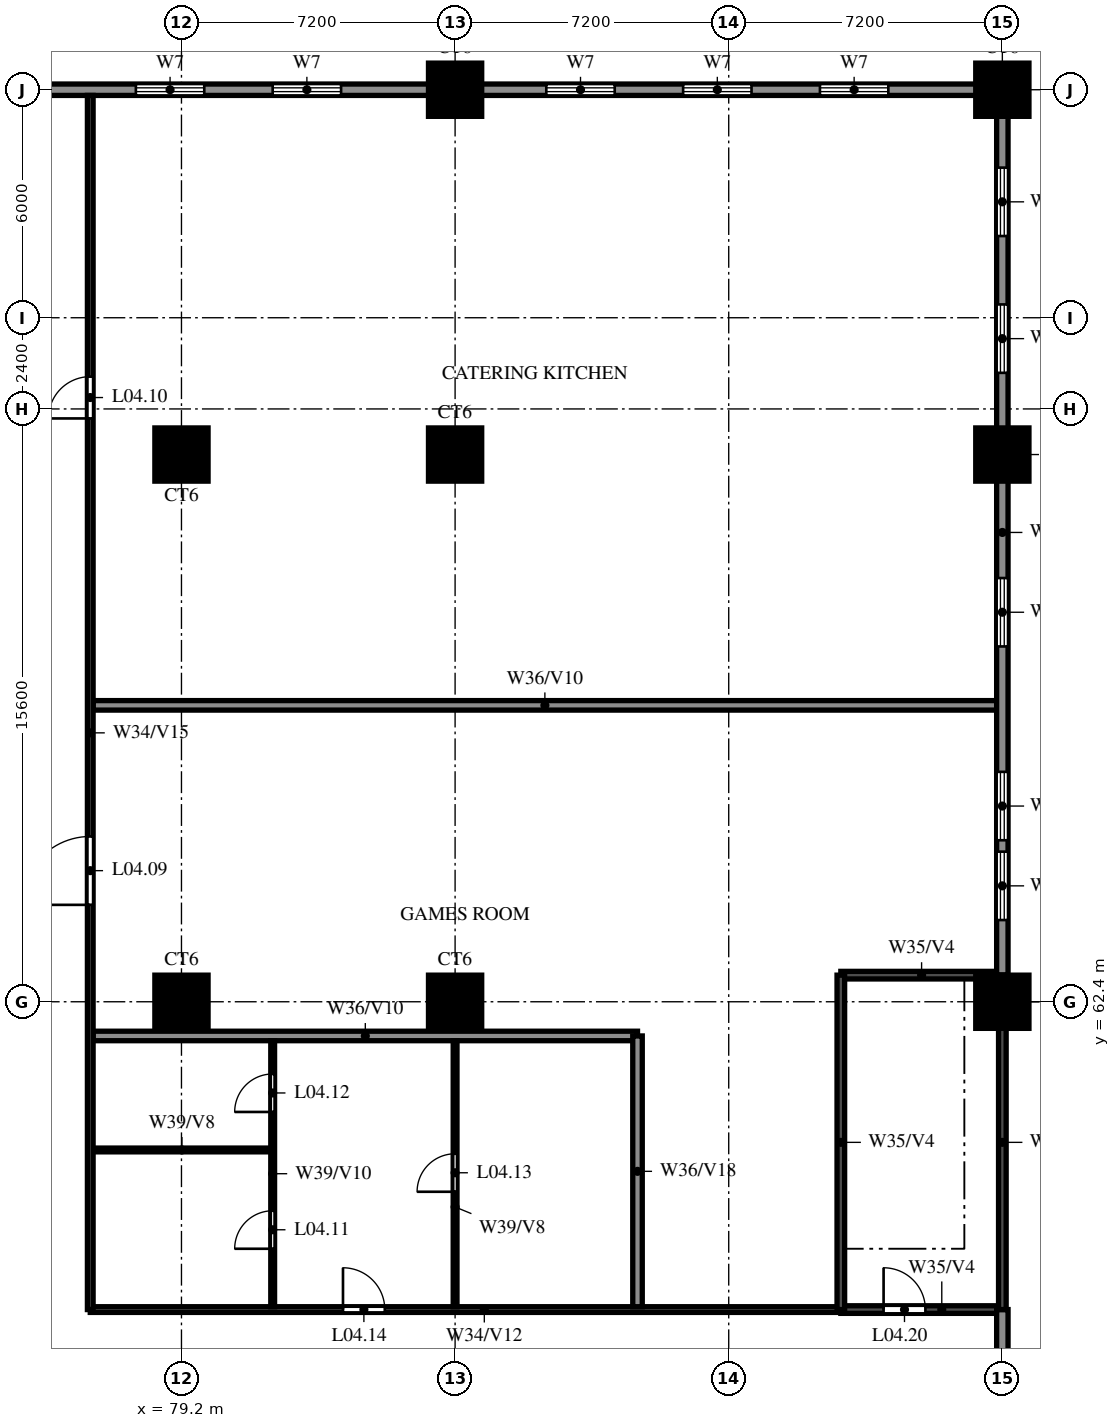
"""IFC4 building model, lengths in metres.
Left out: names, types, materials, properties, quantities, classifications, styles, units other than length and angle.
Written with IfcOpenShell. Run it as: python <this file> out.ifc"""

import sys

from ifc_helpers import new_model, si_unit, direction, frame, frame_2d, origin, origin_2d, place, context, subcontext, project, spatial, rectangle, circle, extrude, source, transform, mapped, element, fill, save


model = new_model("IFC4")
c1 = context("Model", 3, precision=1e-05, world=origin(), true_north=direction((0.0, 1.0)))
c2 = subcontext(c1, "Body", "Model", "MODEL_VIEW")
j1 = project(units=[si_unit("LENGTHUNIT", "METRE"), si_unit("PLANEANGLEUNIT", "RADIAN")], contexts=[c1])
p1 = place(None, origin())
s1 = spatial("IfcSite", under=j1, at=p1, CompositionType="ELEMENT")
p2 = place(p1, origin())
s2 = spatial("IfcBuilding", under=s1, at=p2, CompositionType="ELEMENT")
p3 = place(p2, frame((0.0, 0.0, 21.6)))
s3 = spatial("IfcBuildingStorey", under=s2, at=p3, CompositionType="ELEMENT", Elevation=21.6)
m1 = source(origin(), c2, "Body", "SweptSolid", [
    extrude(circle(Radius=0.7, at=origin_2d()), origin(), (0.0, 0.0, 1.0), 4.95),
])
for number, where, z_axis, x_axis in (
    (1, (79.2, 62.4, 0.0), (0.0, 0.0, 1.0), (1.0, 0.0, 0.0)),
    (2, (86.4, 62.4, 0.0), (0.0, 0.0, 1.0), (1.0, 0.0, 0.0)),
    (3, (100.8, 62.4, 0.0), (0.0, 0.0, 1.0), (1.0, 0.0, 0.0)),
    (4, (79.2, 76.8, 0.0), (0.0, 0.0, 1.0), (1.0, 0.0, 0.0)),
    (5, (86.4, 76.8, 0.0), (0.0, 0.0, 1.0), (1.0, 0.0, 0.0)),
    (6, (100.8, 76.8, 0.0), (0.0, 0.0, 1.0), (1.0, 0.0, 0.0)),
    (7, (86.4, 86.4, 0.0), (0.0, 0.0, 1.0), (1.0, 0.0, 0.0)),
    (8, (100.8, 86.4, 0.0), (0.0, 0.0, 1.0), (1.0, 0.0, 0.0)),
):
    element("IfcColumn", number, at=place(p3, frame(where, z_axis=z_axis, x_axis=x_axis)), inside=s3, PredefinedType="COLUMN", context=c2, shape_type="MappedRepresentation", body=[
        mapped(m1, transform((0.0, 0.0, 0.0))),
    ])
p4 = place(p3, frame((76.8, 54.3, 0.0), z_axis=(0.0, 0.0, 1.0), x_axis=(1.0, 0.0, 0.0)))
e9 = element("IfcWall", 9, at=p4, inside=s3, PredefinedType="PARTITIONING", context=c2, shape_type="SweptSolid", body=[
    extrude(rectangle(XDim=19.75, YDim=0.15, at=frame_2d((9.875, 0.0))), origin(), (0.0, 0.0, 1.0), 3.45),
])
p5 = place(p4, frame((6.65, 0.0, 0.0)))
e10 = element("IfcOpeningElement", 10, at=p5, cuts=e9, PredefinedType="OPENING", context=c2, shape_type="SweptSolid", body=[
    extrude(rectangle(XDim=1.1, YDim=2.1, at=frame_2d((0.55, 1.05))), frame((0.0, 0.085, 0.0), z_axis=(0.0, -1.0, 0.0), x_axis=(1.0, 0.0, 0.0)), (0.0, 0.0, 1.0), 0.17),
])
p6 = place(p3, frame((96.55, 54.3, 0.0), z_axis=(0.0, 0.0, 1.0), x_axis=(1.0, 0.0, 0.0)))
e11 = element("IfcWall", 11, at=p6, inside=s3, PredefinedType="SOLIDWALL", context=c2, shape_type="SweptSolid", body=[
    extrude(rectangle(XDim=4.25, YDim=0.2, at=frame_2d((2.125, 0.0))), origin(), (0.0, 0.0, 1.0), 4.95),
])
p7 = place(p6, frame((1.125, 0.0, 0.0)))
e12 = element("IfcOpeningElement", 12, at=p7, cuts=e11, PredefinedType="OPENING", context=c2, shape_type="SweptSolid", body=[
    extrude(rectangle(XDim=1.1, YDim=2.1, at=frame_2d((0.55, 1.05))), frame((0.0, 0.11, 0.0), z_axis=(0.0, -1.0, 0.0), x_axis=(1.0, 0.0, 0.0)), (0.0, 0.0, 1.0), 0.22),
])
p8 = place(p3, frame((76.875, 58.5, 0.0), z_axis=(0.0, 0.0, 1.0), x_axis=(1.0, 0.0, 0.0)))
e13 = element("IfcWall", 13, at=p8, inside=s3, PredefinedType="PARTITIONING", context=c2, shape_type="SweptSolid", body=[
    extrude(rectangle(XDim=4.675, YDim=0.1, at=frame_2d((2.337, 0.0))), origin(), (0.0, 0.0, 1.0), 3.45),
])
p9 = place(p3, frame((76.875, 61.5, 0.0), z_axis=(0.0, 0.0, 1.0), x_axis=(1.0, 0.0, 0.0)))
e14 = element("IfcWall", 14, at=p9, inside=s3, PredefinedType="SOLIDWALL", context=c2, shape_type="SweptSolid", body=[
    extrude(rectangle(XDim=14.325, YDim=0.25, at=frame_2d((7.163, 0.0))), origin(), (0.0, 0.0, 1.0), 3.45),
])
p10 = place(p3, frame((96.55, 63.1, 0.0), z_axis=(0.0, 0.0, 1.0), x_axis=(1.0, 0.0, 0.0)))
e15 = element("IfcWall", 15, at=p10, inside=s3, PredefinedType="SOLIDWALL", context=c2, shape_type="SweptSolid", body=[
    extrude(rectangle(XDim=4.25, YDim=0.2, at=frame_2d((2.125, 0.0))), origin(), (0.0, 0.0, 1.0), 4.95),
])
p11 = place(p3, frame((76.875, 70.2, 0.0), z_axis=(0.0, 0.0, 1.0), x_axis=(1.0, 0.0, 0.0)))
e16 = element("IfcWall", 16, at=p11, inside=s3, PredefinedType="SOLIDWALL", context=c2, shape_type="SweptSolid", body=[
    extrude(rectangle(XDim=23.775, YDim=0.25, at=frame_2d((11.887, 0.0))), origin(), (0.0, 0.0, 1.0), 3.45),
])
p12 = place(p3, frame((0.0, 86.4, 0.0), z_axis=(0.0, 0.0, 1.0), x_axis=(1.0, 0.0, 0.0)))
e17 = element("IfcWall", 17, at=p12, inside=s3, PredefinedType="SOLIDWALL", context=c2, shape_type="SweptSolid", body=[
    extrude(rectangle(XDim=100.8, YDim=0.3, at=frame_2d((50.4, 0.0))), origin(), (0.0, 0.0, 1.0), 4.95),
])
p13 = place(p12, frame((2.4, 0.0, 0.6)))
e18 = element("IfcOpeningElement", 18, at=p13, cuts=e17, PredefinedType="OPENING", context=c2, shape_type="SweptSolid", body=[
    extrude(rectangle(XDim=1.8, YDim=2.4, at=frame_2d((0.9, 1.2))), frame((0.0, 0.16, 0.0), z_axis=(0.0, -1.0, 0.0), x_axis=(1.0, 0.0, 0.0)), (0.0, 0.0, 1.0), 0.32),
])
p14 = place(p12, frame((6.0, 0.0, 0.6)))
e19 = element("IfcOpeningElement", 19, at=p14, cuts=e17, PredefinedType="OPENING", context=c2, shape_type="SweptSolid", body=[
    extrude(rectangle(XDim=1.8, YDim=2.4, at=frame_2d((0.9, 1.2))), frame((0.0, 0.16, 0.0), z_axis=(0.0, -1.0, 0.0), x_axis=(1.0, 0.0, 0.0)), (0.0, 0.0, 1.0), 0.32),
])
p15 = place(p12, frame((9.6, 0.0, 0.6)))
e20 = element("IfcOpeningElement", 20, at=p15, cuts=e17, PredefinedType="OPENING", context=c2, shape_type="SweptSolid", body=[
    extrude(rectangle(XDim=1.8, YDim=2.4, at=frame_2d((0.9, 1.2))), frame((0.0, 0.16, 0.0), z_axis=(0.0, -1.0, 0.0), x_axis=(1.0, 0.0, 0.0)), (0.0, 0.0, 1.0), 0.32),
])
p16 = place(p12, frame((16.8, 0.0, 0.6)))
e21 = element("IfcOpeningElement", 21, at=p16, cuts=e17, PredefinedType="OPENING", context=c2, shape_type="SweptSolid", body=[
    extrude(rectangle(XDim=1.8, YDim=2.4, at=frame_2d((0.9, 1.2))), frame((0.0, 0.16, 0.0), z_axis=(0.0, -1.0, 0.0), x_axis=(1.0, 0.0, 0.0)), (0.0, 0.0, 1.0), 0.32),
])
p17 = place(p12, frame((20.4, 0.0, 0.6)))
e22 = element("IfcOpeningElement", 22, at=p17, cuts=e17, PredefinedType="OPENING", context=c2, shape_type="SweptSolid", body=[
    extrude(rectangle(XDim=1.8, YDim=2.4, at=frame_2d((0.9, 1.2))), frame((0.0, 0.16, 0.0), z_axis=(0.0, -1.0, 0.0), x_axis=(1.0, 0.0, 0.0)), (0.0, 0.0, 1.0), 0.32),
])
p18 = place(p12, frame((78.0, 0.0, 0.6)))
e23 = element("IfcOpeningElement", 23, at=p18, cuts=e17, PredefinedType="OPENING", context=c2, shape_type="SweptSolid", body=[
    extrude(rectangle(XDim=1.8, YDim=2.4, at=frame_2d((0.9, 1.2))), frame((0.0, 0.16, 0.0), z_axis=(0.0, -1.0, 0.0), x_axis=(1.0, 0.0, 0.0)), (0.0, 0.0, 1.0), 0.32),
])
p19 = place(p12, frame((81.6, 0.0, 0.6)))
e24 = element("IfcOpeningElement", 24, at=p19, cuts=e17, PredefinedType="OPENING", context=c2, shape_type="SweptSolid", body=[
    extrude(rectangle(XDim=1.8, YDim=2.4, at=frame_2d((0.9, 1.2))), frame((0.0, 0.16, 0.0), z_axis=(0.0, -1.0, 0.0), x_axis=(1.0, 0.0, 0.0)), (0.0, 0.0, 1.0), 0.32),
])
p20 = place(p12, frame((88.8, 0.0, 0.6)))
e25 = element("IfcOpeningElement", 25, at=p20, cuts=e17, PredefinedType="OPENING", context=c2, shape_type="SweptSolid", body=[
    extrude(rectangle(XDim=1.8, YDim=2.4, at=frame_2d((0.9, 1.2))), frame((0.0, 0.16, 0.0), z_axis=(0.0, -1.0, 0.0), x_axis=(1.0, 0.0, 0.0)), (0.0, 0.0, 1.0), 0.32),
])
p21 = place(p12, frame((92.4, 0.0, 0.6)))
e26 = element("IfcOpeningElement", 26, at=p21, cuts=e17, PredefinedType="OPENING", context=c2, shape_type="SweptSolid", body=[
    extrude(rectangle(XDim=1.8, YDim=2.4, at=frame_2d((0.9, 1.2))), frame((0.0, 0.16, 0.0), z_axis=(0.0, -1.0, 0.0), x_axis=(1.0, 0.0, 0.0)), (0.0, 0.0, 1.0), 0.32),
])
p22 = place(p12, frame((96.0, 0.0, 0.6)))
e27 = element("IfcOpeningElement", 27, at=p22, cuts=e17, PredefinedType="OPENING", context=c2, shape_type="SweptSolid", body=[
    extrude(rectangle(XDim=1.8, YDim=2.4, at=frame_2d((0.9, 1.2))), frame((0.0, 0.16, 0.0), z_axis=(0.0, -1.0, 0.0), x_axis=(1.0, 0.0, 0.0)), (0.0, 0.0, 1.0), 0.32),
])
p23 = place(p3, frame((76.8, 54.3, 0.0), z_axis=(0.0, 0.0, 1.0), x_axis=(0.0, 1.0, 0.0)))
e28 = element("IfcWall", 28, at=p23, inside=s3, PredefinedType="PARTITIONING", context=c2, shape_type="SweptSolid", body=[
    extrude(rectangle(XDim=31.95, YDim=0.15, at=frame_2d((15.975, 0.0))), origin(), (0.0, 0.0, 1.0), 3.75),
])
p24 = place(p23, frame((10.65, 0.0, 0.0)))
e29 = element("IfcOpeningElement", 29, at=p24, cuts=e28, PredefinedType="OPENING", context=c2, shape_type="SweptSolid", body=[
    extrude(rectangle(XDim=1.8, YDim=2.1, at=frame_2d((0.9, 1.05))), frame((0.0, 0.085, 0.0), z_axis=(0.0, -1.0, 0.0), x_axis=(1.0, 0.0, 0.0)), (0.0, 0.0, 1.0), 0.17),
])
p25 = place(p23, frame((23.45, 0.0, 0.0)))
e30 = element("IfcOpeningElement", 30, at=p25, cuts=e28, PredefinedType="OPENING", context=c2, shape_type="SweptSolid", body=[
    extrude(rectangle(XDim=1.1, YDim=2.1, at=frame_2d((0.55, 1.05))), frame((0.0, 0.085, 0.0), z_axis=(0.0, -1.0, 0.0), x_axis=(1.0, 0.0, 0.0)), (0.0, 0.0, 1.0), 0.17),
])
p26 = place(p3, frame((81.6, 54.375, 0.0), z_axis=(0.0, 0.0, 1.0), x_axis=(0.0, 1.0, 0.0)))
e31 = element("IfcWall", 31, at=p26, inside=s3, PredefinedType="PARTITIONING", context=c2, shape_type="SweptSolid", body=[
    extrude(rectangle(XDim=7.0, YDim=0.1, at=frame_2d((3.5, 0.0))), origin(), (0.0, 0.0, 1.0), 4.95),
])
p27 = place(p26, frame((1.525, 0.0, 0.0)))
e32 = element("IfcOpeningElement", 32, at=p27, cuts=e31, PredefinedType="OPENING", context=c2, shape_type="SweptSolid", body=[
    extrude(rectangle(XDim=1.0, YDim=2.1, at=frame_2d((0.5, 1.05))), frame((0.0, 0.06, 0.0), z_axis=(0.0, -1.0, 0.0), x_axis=(1.0, 0.0, 0.0)), (0.0, 0.0, 1.0), 0.12),
])
p28 = place(p26, frame((5.125, 0.0, 0.0)))
e33 = element("IfcOpeningElement", 33, at=p28, cuts=e31, PredefinedType="OPENING", context=c2, shape_type="SweptSolid", body=[
    extrude(rectangle(XDim=1.0, YDim=2.1, at=frame_2d((0.5, 1.05))), frame((0.0, 0.06, 0.0), z_axis=(0.0, -1.0, 0.0), x_axis=(1.0, 0.0, 0.0)), (0.0, 0.0, 1.0), 0.12),
])
p29 = place(p3, frame((86.4, 54.375, 0.0), z_axis=(0.0, 0.0, 1.0), x_axis=(0.0, 1.0, 0.0)))
e34 = element("IfcWall", 34, at=p29, inside=s3, PredefinedType="PARTITIONING", context=c2, shape_type="SweptSolid", body=[
    extrude(rectangle(XDim=7.0, YDim=0.1, at=frame_2d((3.5, 0.0))), origin(), (0.0, 0.0, 1.0), 3.45),
])
p30 = place(p29, frame((3.025, 0.0, 0.0)))
e35 = element("IfcOpeningElement", 35, at=p30, cuts=e34, PredefinedType="OPENING", context=c2, shape_type="SweptSolid", body=[
    extrude(rectangle(XDim=1.0, YDim=2.1, at=frame_2d((0.5, 1.05))), frame((0.0, 0.06, 0.0), z_axis=(0.0, -1.0, 0.0), x_axis=(1.0, 0.0, 0.0)), (0.0, 0.0, 1.0), 0.12),
])
p31 = place(p3, frame((91.2, 54.375, 0.0), z_axis=(0.0, 0.0, 1.0), x_axis=(0.0, 1.0, 0.0)))
e36 = element("IfcWall", 36, at=p31, inside=s3, PredefinedType="SOLIDWALL", context=c2, shape_type="SweptSolid", body=[
    extrude(rectangle(XDim=7.125, YDim=0.25, at=frame_2d((3.562, 0.0))), origin(), (0.0, 0.0, 1.0), 4.95),
])
p32 = place(p3, frame((96.55, 54.3, 0.0), z_axis=(0.0, 0.0, 1.0), x_axis=(0.0, 1.0, 0.0)))
e37 = element("IfcWall", 37, at=p32, inside=s3, PredefinedType="SOLIDWALL", context=c2, shape_type="SweptSolid", body=[
    extrude(rectangle(XDim=8.8, YDim=0.2, at=frame_2d((4.4, 0.0))), origin(), (0.0, 0.0, 1.0), 4.95),
])
p33 = place(p3, frame((100.8, 51.1, 0.0), z_axis=(0.0, 0.0, 1.0), x_axis=(0.0, 1.0, 0.0)))
e38 = element("IfcWall", 38, at=p33, inside=s3, PredefinedType="SOLIDWALL", context=c2, shape_type="SweptSolid", body=[
    extrude(rectangle(XDim=3.2, YDim=0.3, at=frame_2d((1.6, 0.0))), origin(), (0.0, 0.0, 1.0), 4.95),
])
p34 = place(p3, frame((100.8, 63.1, 0.0), z_axis=(0.0, 0.0, 1.0), x_axis=(0.0, 1.0, 0.0)))
e39 = element("IfcWall", 39, at=p34, inside=s3, PredefinedType="SOLIDWALL", context=c2, shape_type="SweptSolid", body=[
    extrude(rectangle(XDim=23.3, YDim=0.3, at=frame_2d((11.65, 0.0))), origin(), (0.0, 0.0, 1.0), 4.95),
])
p35 = place(p34, frame((1.45, 0.0, 0.6)))
e40 = element("IfcOpeningElement", 40, at=p35, cuts=e39, PredefinedType="OPENING", context=c2, shape_type="SweptSolid", body=[
    extrude(rectangle(XDim=1.8, YDim=2.4, at=frame_2d((0.9, 1.2))), frame((0.0, 0.16, 0.0), z_axis=(0.0, -1.0, 0.0), x_axis=(1.0, 0.0, 0.0)), (0.0, 0.0, 1.0), 0.32),
])
p36 = place(p34, frame((3.55, 0.0, 0.6)))
e41 = element("IfcOpeningElement", 41, at=p36, cuts=e39, PredefinedType="OPENING", context=c2, shape_type="SweptSolid", body=[
    extrude(rectangle(XDim=1.8, YDim=2.4, at=frame_2d((0.9, 1.2))), frame((0.0, 0.16, 0.0), z_axis=(0.0, -1.0, 0.0), x_axis=(1.0, 0.0, 0.0)), (0.0, 0.0, 1.0), 0.32),
])
p37 = place(p34, frame((8.65, 0.0, 0.6)))
e42 = element("IfcOpeningElement", 42, at=p37, cuts=e39, PredefinedType="OPENING", context=c2, shape_type="SweptSolid", body=[
    extrude(rectangle(XDim=1.8, YDim=2.4, at=frame_2d((0.9, 1.2))), frame((0.0, 0.16, 0.0), z_axis=(0.0, -1.0, 0.0), x_axis=(1.0, 0.0, 0.0)), (0.0, 0.0, 1.0), 0.32),
])
p38 = place(p34, frame((15.85, 0.0, 0.6)))
e43 = element("IfcOpeningElement", 43, at=p38, cuts=e39, PredefinedType="OPENING", context=c2, shape_type="SweptSolid", body=[
    extrude(rectangle(XDim=1.8, YDim=2.4, at=frame_2d((0.9, 1.2))), frame((0.0, 0.16, 0.0), z_axis=(0.0, -1.0, 0.0), x_axis=(1.0, 0.0, 0.0)), (0.0, 0.0, 1.0), 0.32),
])
p39 = place(p34, frame((19.45, 0.0, 0.6)))
e44 = element("IfcOpeningElement", 44, at=p39, cuts=e39, PredefinedType="OPENING", context=c2, shape_type="SweptSolid", body=[
    extrude(rectangle(XDim=1.8, YDim=2.4, at=frame_2d((0.9, 1.2))), frame((0.0, 0.16, 0.0), z_axis=(0.0, -1.0, 0.0), x_axis=(1.0, 0.0, 0.0)), (0.0, 0.0, 1.0), 0.32),
])
p40 = place(p3, frame((100.8, 54.3, 0.0), z_axis=(0.0, 0.0, 1.0), x_axis=(0.0, 1.0, 0.0)))
e45 = element("IfcWall", 45, at=p40, inside=s3, PredefinedType="SOLIDWALL", context=c2, shape_type="SweptSolid", body=[
    extrude(rectangle(XDim=8.8, YDim=0.2, at=frame_2d((4.4, 0.0))), origin(), (0.0, 0.0, 1.0), 4.95),
])
p41 = place(p24, origin())
e46 = element("IfcDoor", 46, at=p41, inside=s3, OperationType="DOUBLE_DOOR_SINGLE_SWING", PredefinedType="DOOR", context=c2, shape_type="SweptSolid", body=[
    extrude(rectangle(XDim=1.8, YDim=2.1, at=frame_2d((0.9, 1.05))), frame((0.0, 0.025, 0.0), z_axis=(0.0, -1.0, 0.0), x_axis=(1.0, 0.0, 0.0)), (0.0, 0.0, 1.0), 0.05),
])
fill(e29, e46)
p42 = place(p25, origin())
e47 = element("IfcDoor", 47, at=p42, inside=s3, OperationType="SINGLE_SWING_RIGHT", PredefinedType="DOOR", context=c2, shape_type="SweptSolid", body=[
    extrude(rectangle(XDim=1.1, YDim=2.1, at=frame_2d((0.55, 1.05))), frame((0.0, 0.025, 0.0), z_axis=(0.0, -1.0, 0.0), x_axis=(1.0, 0.0, 0.0)), (0.0, 0.0, 1.0), 0.05),
])
fill(e30, e47)
p43 = place(p27, origin())
e48 = element("IfcDoor", 48, at=p43, inside=s3, OperationType="SINGLE_SWING_LEFT", PredefinedType="DOOR", context=c2, shape_type="SweptSolid", body=[
    extrude(rectangle(XDim=1.0, YDim=2.1, at=frame_2d((0.5, 1.05))), frame((0.0, 0.025, 0.0), z_axis=(0.0, -1.0, 0.0), x_axis=(1.0, 0.0, 0.0)), (0.0, 0.0, 1.0), 0.05),
])
fill(e32, e48)
p44 = place(p28, origin())
e49 = element("IfcDoor", 49, at=p44, inside=s3, OperationType="SINGLE_SWING_RIGHT", PredefinedType="DOOR", context=c2, shape_type="SweptSolid", body=[
    extrude(rectangle(XDim=1.0, YDim=2.1, at=frame_2d((0.5, 1.05))), frame((0.0, 0.025, 0.0), z_axis=(0.0, -1.0, 0.0), x_axis=(1.0, 0.0, 0.0)), (0.0, 0.0, 1.0), 0.05),
])
fill(e33, e49)
p45 = place(p30, origin())
e50 = element("IfcDoor", 50, at=p45, inside=s3, OperationType="SINGLE_SWING_RIGHT", PredefinedType="DOOR", context=c2, shape_type="SweptSolid", body=[
    extrude(rectangle(XDim=1.0, YDim=2.1, at=frame_2d((0.5, 1.05))), frame((0.0, 0.025, 0.0), z_axis=(0.0, -1.0, 0.0), x_axis=(1.0, 0.0, 0.0)), (0.0, 0.0, 1.0), 0.05),
])
fill(e35, e50)
p46 = place(p5, origin())
e51 = element("IfcDoor", 51, at=p46, inside=s3, OperationType="SINGLE_SWING_LEFT", PredefinedType="DOOR", context=c2, shape_type="SweptSolid", body=[
    extrude(rectangle(XDim=1.1, YDim=2.1, at=frame_2d((0.55, 1.05))), frame((0.0, 0.025, 0.0), z_axis=(0.0, -1.0, 0.0), x_axis=(1.0, 0.0, 0.0)), (0.0, 0.0, 1.0), 0.05),
])
fill(e10, e51)
p47 = place(p7, origin())
e52 = element("IfcDoor", 52, at=p47, inside=s3, OperationType="SINGLE_SWING_LEFT", PredefinedType="DOOR", context=c2, shape_type="SweptSolid", body=[
    extrude(rectangle(XDim=1.1, YDim=2.1, at=frame_2d((0.55, 1.05))), frame((0.0, 0.025, 0.0), z_axis=(0.0, -1.0, 0.0), x_axis=(1.0, 0.0, 0.0)), (0.0, 0.0, 1.0), 0.05),
])
fill(e12, e52)
p48 = place(p18, origin())
e53 = element("IfcWindow", 53, at=p48, inside=s3, PartitioningType="DOUBLE_PANEL_VERTICAL", PredefinedType="WINDOW", context=c2, shape_type="SweptSolid", body=[
    extrude(rectangle(XDim=1.8, YDim=2.4, at=frame_2d((0.9, 1.2))), frame((0.0, 0.03, 0.0), z_axis=(0.0, -1.0, 0.0), x_axis=(1.0, 0.0, 0.0)), (0.0, 0.0, 1.0), 0.06),
])
fill(e23, e53)
p49 = place(p19, origin())
e54 = element("IfcWindow", 54, at=p49, inside=s3, PartitioningType="DOUBLE_PANEL_VERTICAL", PredefinedType="WINDOW", context=c2, shape_type="SweptSolid", body=[
    extrude(rectangle(XDim=1.8, YDim=2.4, at=frame_2d((0.9, 1.2))), frame((0.0, 0.03, 0.0), z_axis=(0.0, -1.0, 0.0), x_axis=(1.0, 0.0, 0.0)), (0.0, 0.0, 1.0), 0.06),
])
fill(e24, e54)
p50 = place(p20, origin())
e55 = element("IfcWindow", 55, at=p50, inside=s3, PartitioningType="DOUBLE_PANEL_VERTICAL", PredefinedType="WINDOW", context=c2, shape_type="SweptSolid", body=[
    extrude(rectangle(XDim=1.8, YDim=2.4, at=frame_2d((0.9, 1.2))), frame((0.0, 0.03, 0.0), z_axis=(0.0, -1.0, 0.0), x_axis=(1.0, 0.0, 0.0)), (0.0, 0.0, 1.0), 0.06),
])
fill(e25, e55)
p51 = place(p21, origin())
e56 = element("IfcWindow", 56, at=p51, inside=s3, PartitioningType="DOUBLE_PANEL_VERTICAL", PredefinedType="WINDOW", context=c2, shape_type="SweptSolid", body=[
    extrude(rectangle(XDim=1.8, YDim=2.4, at=frame_2d((0.9, 1.2))), frame((0.0, 0.03, 0.0), z_axis=(0.0, -1.0, 0.0), x_axis=(1.0, 0.0, 0.0)), (0.0, 0.0, 1.0), 0.06),
])
fill(e26, e56)
p52 = place(p22, origin())
e57 = element("IfcWindow", 57, at=p52, inside=s3, PartitioningType="DOUBLE_PANEL_VERTICAL", PredefinedType="WINDOW", context=c2, shape_type="SweptSolid", body=[
    extrude(rectangle(XDim=1.8, YDim=2.4, at=frame_2d((0.9, 1.2))), frame((0.0, 0.03, 0.0), z_axis=(0.0, -1.0, 0.0), x_axis=(1.0, 0.0, 0.0)), (0.0, 0.0, 1.0), 0.06),
])
fill(e27, e57)
p53 = place(p35, origin())
e58 = element("IfcWindow", 58, at=p53, inside=s3, PartitioningType="DOUBLE_PANEL_VERTICAL", PredefinedType="WINDOW", context=c2, shape_type="SweptSolid", body=[
    extrude(rectangle(XDim=1.8, YDim=2.4, at=frame_2d((0.9, 1.2))), frame((0.0, 0.03, 0.0), z_axis=(0.0, -1.0, 0.0), x_axis=(1.0, 0.0, 0.0)), (0.0, 0.0, 1.0), 0.06),
])
fill(e40, e58)
p54 = place(p36, origin())
e59 = element("IfcWindow", 59, at=p54, inside=s3, PartitioningType="DOUBLE_PANEL_VERTICAL", PredefinedType="WINDOW", context=c2, shape_type="SweptSolid", body=[
    extrude(rectangle(XDim=1.8, YDim=2.4, at=frame_2d((0.9, 1.2))), frame((0.0, 0.03, 0.0), z_axis=(0.0, -1.0, 0.0), x_axis=(1.0, 0.0, 0.0)), (0.0, 0.0, 1.0), 0.06),
])
fill(e41, e59)
p55 = place(p37, origin())
e60 = element("IfcWindow", 60, at=p55, inside=s3, PartitioningType="DOUBLE_PANEL_VERTICAL", PredefinedType="WINDOW", context=c2, shape_type="SweptSolid", body=[
    extrude(rectangle(XDim=1.8, YDim=2.4, at=frame_2d((0.9, 1.2))), frame((0.0, 0.03, 0.0), z_axis=(0.0, -1.0, 0.0), x_axis=(1.0, 0.0, 0.0)), (0.0, 0.0, 1.0), 0.06),
])
fill(e42, e60)
p56 = place(p38, origin())
e61 = element("IfcWindow", 61, at=p56, inside=s3, PartitioningType="DOUBLE_PANEL_VERTICAL", PredefinedType="WINDOW", context=c2, shape_type="SweptSolid", body=[
    extrude(rectangle(XDim=1.8, YDim=2.4, at=frame_2d((0.9, 1.2))), frame((0.0, 0.03, 0.0), z_axis=(0.0, -1.0, 0.0), x_axis=(1.0, 0.0, 0.0)), (0.0, 0.0, 1.0), 0.06),
])
fill(e43, e61)
p57 = place(p39, origin())
e62 = element("IfcWindow", 62, at=p57, inside=s3, PartitioningType="DOUBLE_PANEL_VERTICAL", PredefinedType="WINDOW", context=c2, shape_type="SweptSolid", body=[
    extrude(rectangle(XDim=1.8, YDim=2.4, at=frame_2d((0.9, 1.2))), frame((0.0, 0.03, 0.0), z_axis=(0.0, -1.0, 0.0), x_axis=(1.0, 0.0, 0.0)), (0.0, 0.0, 1.0), 0.06),
])
fill(e44, e62)
save(model, sys.argv[1])
